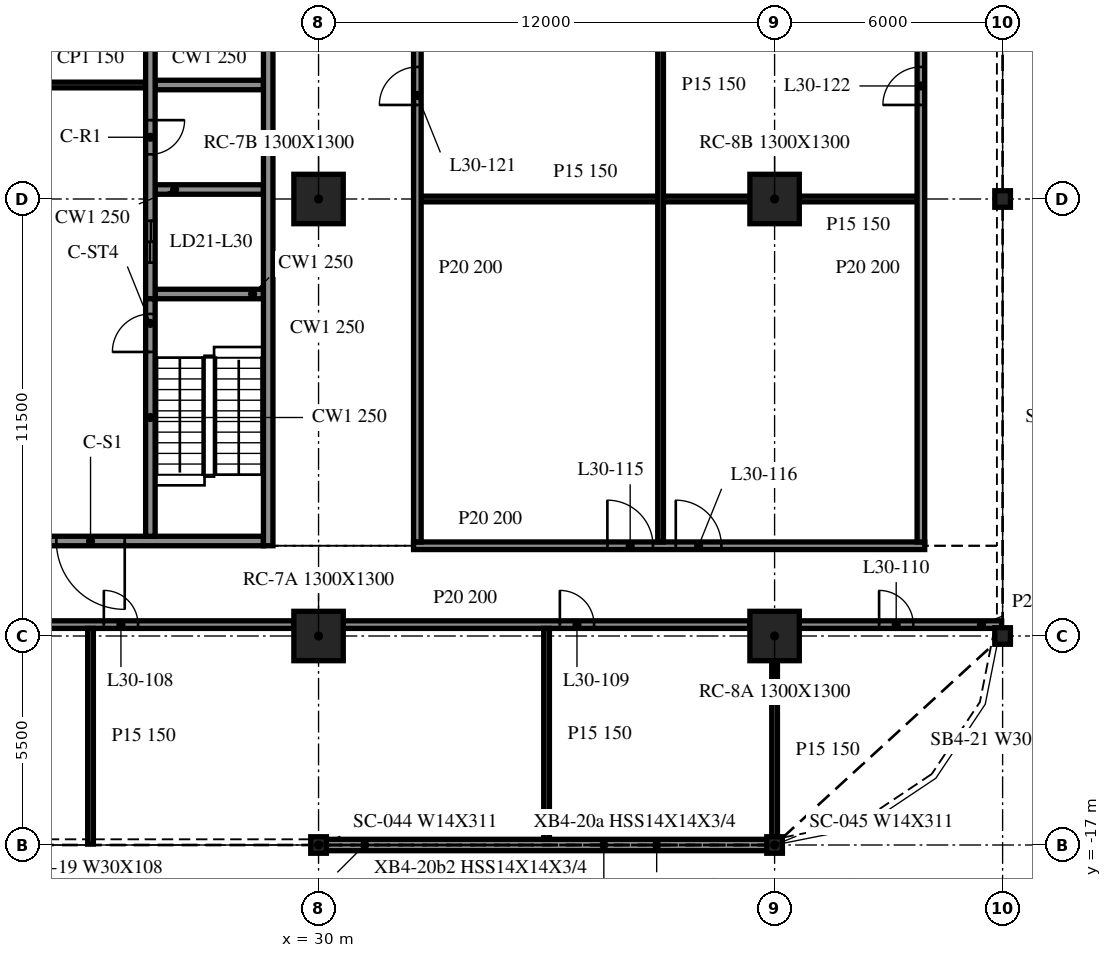
"""IFC4 building model, lengths in metres.
Left out: names, types, materials, properties, quantities, classifications, styles, units other than length and angle.
Written with IfcOpenShell. Run it as: python <this file> out.ifc"""

import sys

from ifc_helpers import new_model, si_unit, direction, frame, frame_2d, origin, origin_2d, place, context, subcontext, project, spatial, rectangle, i_section, extrude, element, fill, save


model = new_model("IFC4")
c1 = context("Model", 3, precision=1e-05, world=origin(), true_north=direction((0.0, 1.0)))
c2 = subcontext(c1, "Body", "Model", "MODEL_VIEW")
j1 = project(units=[si_unit("LENGTHUNIT", "METRE"), si_unit("PLANEANGLEUNIT", "RADIAN")], contexts=[c1])
p1 = place(None, origin())
s1 = spatial("IfcSite", under=j1, at=p1, CompositionType="ELEMENT")
p2 = place(p1, origin())
s2 = spatial("IfcBuilding", under=s1, at=p2, CompositionType="ELEMENT")
p3 = place(p2, frame((0.0, 0.0, 130.2)))
s3 = spatial("IfcBuildingStorey", under=s2, at=p3, CompositionType="ELEMENT", Elevation=130.2)
for number, where, z_axis, x_axis in (
    (1, (30.0, -11.5, -0.34), (0.0, 0.0, 1.0), (1.0, 0.0, 0.0)),
    (2, (30.0, 0.0, -0.34), (0.0, 0.0, 1.0), (1.0, 0.0, 0.0)),
    (3, (42.0, -11.5, -0.34), (0.0, 0.0, 1.0), (1.0, 0.0, 0.0)),
    (4, (42.0, 0.0, -0.34), (0.0, 0.0, 1.0), (1.0, 0.0, 0.0)),
):
    element("IfcColumn", number, at=place(p3, frame(where, z_axis=z_axis, x_axis=x_axis)), inside=s3, PredefinedType="COLUMN", context=c2, shape_type="SweptSolid", body=[
        extrude(rectangle(XDim=1.3, YDim=1.3, at=origin_2d()), origin(), (0.0, 0.0, 1.0), 4.1),
    ])
for number, where, z_axis, x_axis in (
    (5, (30.0, -17.0, -0.34), (0.0, 0.0, 1.0), (1.0, 0.0, 0.0)),
    (6, (42.0, -17.0, -0.34), (0.0, 0.0, 1.0), (1.0, 0.0, 0.0)),
    (7, (48.0, -11.5, -0.34), (0.0, 0.0, 1.0), (1.0, 0.0, 0.0)),
    (8, (48.0, 0.0, -0.34), (0.0, 0.0, 1.0), (1.0, 0.0, 0.0)),
):
    element("IfcColumn", number, at=place(p3, frame(where, z_axis=z_axis, x_axis=x_axis)), inside=s3, PredefinedType="COLUMN", context=c2, shape_type="SweptSolid", body=[
        extrude(i_section(OverallWidth=0.412, OverallDepth=0.434, WebThickness=0.036, FlangeThickness=0.057, at=origin_2d()), origin(), (0.0, 0.0, 1.0), 4.1),
    ])
p4 = place(p3, frame((30.018, -17.0, 0.0), z_axis=(0.0, 0.0, 1.0), x_axis=(1.0, 0.0, 0.0)))
e9 = element("IfcWall", 9, at=p4, inside=s3, PredefinedType="NOTDEFINED", context=c2, shape_type="SweptSolid", body=[
    extrude(rectangle(XDim=11.964, YDim=0.3, at=frame_2d((5.982, 0.0))), origin(), (0.0, 0.0, 1.0), 3.003),
])
p5 = place(p3, frame((28.675, -9.125, 0.0), z_axis=(0.0, 0.0, 1.0), x_axis=(0.0, 1.0, 0.0)))
e10 = element("IfcWall", 10, at=p5, inside=s3, PredefinedType="SOLIDWALL", context=c2, shape_type="SweptSolid", body=[
    extrude(rectangle(XDim=24.25, YDim=0.25, at=frame_2d((12.125, 0.0))), origin(), (0.0, 0.0, 1.0), 3.76),
])
p6 = place(p5, frame((14.425, 0.0, 0.0)))
e11 = element("IfcOpeningElement", 11, at=p6, cuts=e10, PredefinedType="OPENING", context=c2, shape_type="SweptSolid", body=[
    extrude(rectangle(XDim=0.9, YDim=2.1, at=frame_2d((0.45, 1.05))), frame((0.0, 0.135, 0.0), z_axis=(0.0, -1.0, 0.0), x_axis=(1.0, 0.0, 0.0)), (0.0, 0.0, 1.0), 0.27),
])
p7 = place(p5, frame((19.012, 0.0, 0.0)))
e12 = element("IfcOpeningElement", 12, at=p7, cuts=e10, PredefinedType="OPENING", context=c2, shape_type="SweptSolid", body=[
    extrude(rectangle(XDim=0.9, YDim=2.1, at=frame_2d((0.45, 1.05))), frame((0.0, 0.135, 0.0), z_axis=(0.0, -1.0, 0.0), x_axis=(1.0, 0.0, 0.0)), (0.0, 0.0, 1.0), 0.27),
])
p8 = place(p5, frame((22.087, 0.0, 0.0)))
e13 = element("IfcOpeningElement", 13, at=p8, cuts=e10, PredefinedType="OPENING", context=c2, shape_type="SweptSolid", body=[
    extrude(rectangle(XDim=0.9, YDim=2.1, at=frame_2d((0.45, 1.05))), frame((0.0, 0.135, 0.0), z_axis=(0.0, -1.0, 0.0), x_axis=(1.0, 0.0, 0.0)), (0.0, 0.0, 1.0), 0.27),
])
p9 = place(p3, frame((28.55, -9.0, 0.0), z_axis=(0.0, 0.0, 1.0), x_axis=(-1.0, 0.0, 0.0)))
e14 = element("IfcWall", 14, at=p9, inside=s3, PredefinedType="SOLIDWALL", context=c2, shape_type="SweptSolid", body=[
    extrude(rectangle(XDim=9.1, YDim=0.25, at=frame_2d((4.55, 0.0))), origin(), (0.0, 0.0, 1.0), 3.76),
])
p10 = place(p9, frame((3.65, 0.0, 0.0)))
e15 = element("IfcOpeningElement", 15, at=p10, cuts=e14, PredefinedType="OPENING", context=c2, shape_type="SweptSolid", body=[
    extrude(rectangle(XDim=1.8, YDim=2.1, at=frame_2d((0.9, 1.05))), frame((0.0, 0.135, 0.0), z_axis=(0.0, -1.0, 0.0), x_axis=(1.0, 0.0, 0.0)), (0.0, 0.0, 1.0), 0.27),
])
p11 = place(p3, frame((25.575, -8.875, 0.0), z_axis=(0.0, 0.0, 1.0), x_axis=(0.0, 1.0, 0.0)))
e16 = element("IfcWall", 16, at=p11, inside=s3, PredefinedType="SOLIDWALL", context=c2, shape_type="SweptSolid", body=[
    extrude(rectangle(XDim=6.25, YDim=0.25, at=frame_2d((3.125, 0.0))), origin(), (0.0, 0.0, 1.0), 3.76),
])
p12 = place(p11, frame((4.85, 0.0, 0.0)))
e17 = element("IfcOpeningElement", 17, at=p12, cuts=e16, PredefinedType="OPENING", context=c2, shape_type="SweptSolid", body=[
    extrude(rectangle(XDim=1.0, YDim=2.1, at=frame_2d((0.5, 1.05))), frame((0.0, 0.135, 0.0), z_axis=(0.0, -1.0, 0.0), x_axis=(1.0, 0.0, 0.0)), (0.0, 0.0, 1.0), 0.27),
])
p13 = place(p3, frame((25.575, 14.875, 0.0), z_axis=(0.0, 0.0, 1.0), x_axis=(0.0, -1.0, 0.0)))
e18 = element("IfcWall", 18, at=p13, inside=s3, PredefinedType="SOLIDWALL", context=c2, shape_type="SweptSolid", body=[
    extrude(rectangle(XDim=17.5, YDim=0.25, at=frame_2d((8.75, 0.0))), origin(), (0.0, 0.0, 1.0), 3.76),
])
p14 = place(p13, frame((15.45, 0.0, 0.0)))
e19 = element("IfcOpeningElement", 19, at=p14, cuts=e18, PredefinedType="OPENING", context=c2, shape_type="SweptSolid", body=[
    extrude(rectangle(XDim=1.1, YDim=2.1, at=frame_2d((0.55, 1.05))), frame((0.0, 0.135, 0.0), z_axis=(0.0, -1.0, 0.0), x_axis=(1.0, 0.0, 0.0)), (0.0, 0.0, 1.0), 0.27),
])
p15 = place(p13, frame((12.8, 0.0, 0.0)))
e20 = element("IfcOpeningElement", 20, at=p15, cuts=e18, PredefinedType="OPENING", context=c2, shape_type="SweptSolid", body=[
    extrude(rectangle(XDim=0.9, YDim=2.1, at=frame_2d((0.45, 1.05))), frame((0.0, 0.135, 0.0), z_axis=(0.0, -1.0, 0.0), x_axis=(1.0, 0.0, 0.0)), (0.0, 0.0, 1.0), 0.27),
])
for number, where, z_axis, x_axis in (
    (21, (25.7, -2.5, 0.0), (0.0, 0.0, 1.0), (1.0, 0.0, 0.0)),
    (22, (25.7, 0.25, 0.0), (0.0, 0.0, 1.0), (1.0, 0.0, 0.0)),
    (23, (25.7, 3.0, 0.0), (0.0, 0.0, 1.0), (1.0, 0.0, 0.0)),
):
    element("IfcWall", number, at=place(p3, frame(where, z_axis=z_axis, x_axis=x_axis)), inside=s3, PredefinedType="SOLIDWALL", context=c2, shape_type="SweptSolid", body=[
        extrude(rectangle(XDim=2.85, YDim=0.25, at=frame_2d((1.425, 0.0))), origin(), (0.0, 0.0, 1.0), 3.76),
    ])
p16 = place(p3, frame((22.55, 3.0, 0.0), z_axis=(0.0, 0.0, 1.0), x_axis=(1.0, 0.0, 0.0)))
e24 = element("IfcWall", 24, at=p16, inside=s3, PredefinedType="PARTITIONING", context=c2, shape_type="SweptSolid", body=[
    extrude(rectangle(XDim=2.9, YDim=0.15, at=frame_2d((1.45, 0.0))), origin(), (0.0, 0.0, 1.0), 3.76),
])
p17 = place(p3, frame((18.65, -11.2, 0.0), z_axis=(0.0, 0.0, 1.0), x_axis=(1.0, 0.0, 0.0)))
e25 = element("IfcWall", 25, at=p17, inside=s3, PredefinedType="PARTITIONING", context=c2, shape_type="SweptSolid", body=[
    extrude(rectangle(XDim=10.7, YDim=0.2, at=frame_2d((5.35, 0.0))), origin(), (0.0, 0.0, 1.0), 3.76),
])
p18 = place(p17, frame((5.7, 0.0, 0.0)))
e26 = element("IfcOpeningElement", 26, at=p18, cuts=e25, PredefinedType="OPENING", context=c2, shape_type="SweptSolid", body=[
    extrude(rectangle(XDim=0.9, YDim=2.1, at=frame_2d((0.45, 1.05))), frame((0.0, 0.11, 0.0), z_axis=(0.0, -1.0, 0.0), x_axis=(1.0, 0.0, 0.0)), (0.0, 0.0, 1.0), 0.22),
])
p19 = place(p3, frame((30.65, -11.2, 0.0), z_axis=(0.0, 0.0, 1.0), x_axis=(1.0, 0.0, 0.0)))
e27 = element("IfcWall", 27, at=p19, inside=s3, PredefinedType="PARTITIONING", context=c2, shape_type="SweptSolid", body=[
    extrude(rectangle(XDim=10.7, YDim=0.2, at=frame_2d((5.35, 0.0))), origin(), (0.0, 0.0, 1.0), 3.76),
])
p20 = place(p19, frame((5.7, 0.0, 0.0)))
e28 = element("IfcOpeningElement", 28, at=p20, cuts=e27, PredefinedType="OPENING", context=c2, shape_type="SweptSolid", body=[
    extrude(rectangle(XDim=0.9, YDim=2.1, at=frame_2d((0.45, 1.05))), frame((0.0, 0.11, 0.0), z_axis=(0.0, -1.0, 0.0), x_axis=(1.0, 0.0, 0.0)), (0.0, 0.0, 1.0), 0.22),
])
p21 = place(p3, frame((42.65, -11.2, 0.0), z_axis=(0.0, 0.0, 1.0), x_axis=(1.0, 0.0, 0.0)))
e29 = element("IfcWall", 29, at=p21, inside=s3, PredefinedType="PARTITIONING", context=c2, shape_type="SweptSolid", body=[
    extrude(rectangle(XDim=5.325, YDim=0.2, at=frame_2d((2.663, 0.0))), origin(), (0.0, 0.0, 1.0), 3.76),
])
p22 = place(p21, frame((2.1, 0.0, 0.0)))
e30 = element("IfcOpeningElement", 30, at=p22, cuts=e29, PredefinedType="OPENING", context=c2, shape_type="SweptSolid", body=[
    extrude(rectangle(XDim=0.9, YDim=2.1, at=frame_2d((0.45, 1.05))), frame((0.0, 0.11, 0.0), z_axis=(0.0, -1.0, 0.0), x_axis=(1.0, 0.0, 0.0)), (0.0, 0.0, 1.0), 0.22),
])
p23 = place(p3, frame((32.5, -9.125, 0.0), z_axis=(0.0, 0.0, 1.0), x_axis=(1.0, 0.0, 0.0)))
e31 = element("IfcWall", 31, at=p23, inside=s3, PredefinedType="PARTITIONING", context=c2, shape_type="SweptSolid", body=[
    extrude(rectangle(XDim=13.45, YDim=0.2, at=frame_2d((6.725, 0.0))), origin(), (0.0, 0.0, 1.0), 3.76),
])
p24 = place(p23, frame((5.1, 0.0, 0.0)))
e32 = element("IfcOpeningElement", 32, at=p24, cuts=e31, PredefinedType="OPENING", context=c2, shape_type="SweptSolid", body=[
    extrude(rectangle(XDim=1.2, YDim=2.1, at=frame_2d((0.6, 1.05))), frame((0.0, 0.11, 0.0), z_axis=(0.0, -1.0, 0.0), x_axis=(1.0, 0.0, 0.0)), (0.0, 0.0, 1.0), 0.22),
])
p25 = place(p23, frame((6.9, 0.0, 0.0)))
e33 = element("IfcOpeningElement", 33, at=p25, cuts=e31, PredefinedType="OPENING", context=c2, shape_type="SweptSolid", body=[
    extrude(rectangle(XDim=1.2, YDim=2.1, at=frame_2d((0.6, 1.05))), frame((0.0, 0.11, 0.0), z_axis=(0.0, -1.0, 0.0), x_axis=(1.0, 0.0, 0.0)), (0.0, 0.0, 1.0), 0.22),
])
p26 = place(p3, frame((32.7, 0.0, 0.0), z_axis=(0.0, 0.0, 1.0), x_axis=(1.0, 0.0, 0.0)))
e34 = element("IfcWall", 34, at=p26, inside=s3, PredefinedType="PARTITIONING", context=c2, shape_type="SweptSolid", body=[
    extrude(rectangle(XDim=8.65, YDim=0.15, at=frame_2d((4.325, 0.0))), origin(), (0.0, 0.0, 1.0), 3.76),
])
p27 = place(p3, frame((42.65, 0.0, 0.0), z_axis=(0.0, 0.0, 1.0), x_axis=(1.0, 0.0, 0.0)))
e35 = element("IfcWall", 35, at=p27, inside=s3, PredefinedType="PARTITIONING", context=c2, shape_type="SweptSolid", body=[
    extrude(rectangle(XDim=3.1, YDim=0.15, at=frame_2d((1.55, 0.0))), origin(), (0.0, 0.0, 1.0), 3.76),
])
p28 = place(p3, frame((24.0, -16.975, 0.0), z_axis=(0.0, 0.0, 1.0), x_axis=(0.0, 1.0, 0.0)))
e36 = element("IfcWall", 36, at=p28, inside=s3, PredefinedType="PARTITIONING", context=c2, shape_type="SweptSolid", body=[
    extrude(rectangle(XDim=5.675, YDim=0.15, at=frame_2d((2.837, 0.0))), origin(), (0.0, 0.0, 1.0), 3.76),
])
p29 = place(p3, frame((32.6, -9.025, 0.0), z_axis=(0.0, 0.0, 1.0), x_axis=(0.0, 1.0, 0.0)))
e37 = element("IfcWall", 37, at=p29, inside=s3, PredefinedType="PARTITIONING", context=c2, shape_type="SweptSolid", body=[
    extrude(rectangle(XDim=24.05, YDim=0.2, at=frame_2d((12.025, 0.0))), origin(), (0.0, 0.0, 1.0), 3.76),
])
p30 = place(p29, frame((11.5, 0.0, 0.0)))
e38 = element("IfcOpeningElement", 38, at=p30, cuts=e37, PredefinedType="OPENING", context=c2, shape_type="SweptSolid", body=[
    extrude(rectangle(XDim=1.0, YDim=2.1, at=frame_2d((0.5, 1.05))), frame((0.0, 0.11, 0.0), z_axis=(0.0, -1.0, 0.0), x_axis=(1.0, 0.0, 0.0)), (0.0, 0.0, 1.0), 0.22),
])
p31 = place(p3, frame((36.0, -16.85, 0.0), z_axis=(0.0, 0.0, 1.0), x_axis=(0.0, 1.0, 0.0)))
e39 = element("IfcWall", 39, at=p31, inside=s3, PredefinedType="PARTITIONING", context=c2, shape_type="SweptSolid", body=[
    extrude(rectangle(XDim=5.55, YDim=0.15, at=frame_2d((2.775, 0.0))), origin(), (0.0, 0.0, 1.0), 3.76),
])
p32 = place(p3, frame((39.0, -9.025, 0.0), z_axis=(0.0, 0.0, 1.0), x_axis=(0.0, 1.0, 0.0)))
e40 = element("IfcWall", 40, at=p32, inside=s3, PredefinedType="PARTITIONING", context=c2, shape_type="SweptSolid", body=[
    extrude(rectangle(XDim=24.05, YDim=0.15, at=frame_2d((12.025, 0.0))), origin(), (0.0, 0.0, 1.0), 3.76),
])
p33 = place(p3, frame((42.0, -16.847, 0.0), z_axis=(0.0, 0.0, 1.0), x_axis=(0.0, 1.0, 0.0)))
e41 = element("IfcWall", 41, at=p33, inside=s3, PredefinedType="PARTITIONING", context=c2, shape_type="SweptSolid", body=[
    extrude(rectangle(XDim=4.697, YDim=0.15, at=frame_2d((2.349, 0.0))), origin(), (0.0, 0.0, 1.0), 3.76),
])
p34 = place(p3, frame((45.85, -9.025, 0.0), z_axis=(0.0, 0.0, 1.0), x_axis=(0.0, 1.0, 0.0)))
e42 = element("IfcWall", 42, at=p34, inside=s3, PredefinedType="PARTITIONING", context=c2, shape_type="SweptSolid", body=[
    extrude(rectangle(XDim=24.05, YDim=0.2, at=frame_2d((12.025, 0.0))), origin(), (0.0, 0.0, 1.0), 3.76),
])
p35 = place(p34, frame((11.5, 0.0, 0.0)))
e43 = element("IfcOpeningElement", 43, at=p35, cuts=e42, PredefinedType="OPENING", context=c2, shape_type="SweptSolid", body=[
    extrude(rectangle(XDim=1.0, YDim=2.1, at=frame_2d((0.5, 1.05))), frame((0.0, 0.11, 0.0), z_axis=(0.0, -1.0, 0.0), x_axis=(1.0, 0.0, 0.0)), (0.0, 0.0, 1.0), 0.22),
])
p36 = place(p10, origin())
e44 = element("IfcDoor", 44, at=p36, inside=s3, OperationType="DOUBLE_DOOR_SINGLE_SWING", PredefinedType="DOOR", context=c2, shape_type="SweptSolid", body=[
    extrude(rectangle(XDim=1.8, YDim=2.1, at=frame_2d((0.9, 1.05))), frame((0.0, 0.025, 0.0), z_axis=(0.0, -1.0, 0.0), x_axis=(1.0, 0.0, 0.0)), (0.0, 0.0, 1.0), 0.05),
])
fill(e15, e44)
p37 = place(p14, origin())
e45 = element("IfcDoor", 45, at=p37, inside=s3, OperationType="DOUBLE_DOOR_SLIDING", PredefinedType="DOOR", context=c2, shape_type="SweptSolid", body=[
    extrude(rectangle(XDim=1.1, YDim=2.1, at=frame_2d((0.55, 1.05))), frame((0.0, 0.025, 0.0), z_axis=(0.0, -1.0, 0.0), x_axis=(1.0, 0.0, 0.0)), (0.0, 0.0, 1.0), 0.05),
])
fill(e19, e45)
p38 = place(p15, origin())
e46 = element("IfcDoor", 46, at=p38, inside=s3, OperationType="SINGLE_SWING_LEFT", PredefinedType="DOOR", context=c2, shape_type="SweptSolid", body=[
    extrude(rectangle(XDim=0.9, YDim=2.1, at=frame_2d((0.45, 1.05))), frame((0.0, 0.025, 0.0), z_axis=(0.0, -1.0, 0.0), x_axis=(1.0, 0.0, 0.0)), (0.0, 0.0, 1.0), 0.05),
])
fill(e20, e46)
p39 = place(p12, origin())
e47 = element("IfcDoor", 47, at=p39, inside=s3, OperationType="SINGLE_SWING_RIGHT", PredefinedType="DOOR", context=c2, shape_type="SweptSolid", body=[
    extrude(rectangle(XDim=1.0, YDim=2.1, at=frame_2d((0.5, 1.05))), frame((0.0, 0.025, 0.0), z_axis=(0.0, -1.0, 0.0), x_axis=(1.0, 0.0, 0.0)), (0.0, 0.0, 1.0), 0.05),
])
fill(e17, e47)
p40 = place(p18, origin())
e48 = element("IfcDoor", 48, at=p40, inside=s3, OperationType="SINGLE_SWING_LEFT", PredefinedType="DOOR", context=c2, shape_type="SweptSolid", body=[
    extrude(rectangle(XDim=0.9, YDim=2.1, at=frame_2d((0.45, 1.05))), frame((0.0, 0.025, 0.0), z_axis=(0.0, -1.0, 0.0), x_axis=(1.0, 0.0, 0.0)), (0.0, 0.0, 1.0), 0.05),
])
fill(e26, e48)
p41 = place(p20, origin())
e49 = element("IfcDoor", 49, at=p41, inside=s3, OperationType="SINGLE_SWING_LEFT", PredefinedType="DOOR", context=c2, shape_type="SweptSolid", body=[
    extrude(rectangle(XDim=0.9, YDim=2.1, at=frame_2d((0.45, 1.05))), frame((0.0, 0.025, 0.0), z_axis=(0.0, -1.0, 0.0), x_axis=(1.0, 0.0, 0.0)), (0.0, 0.0, 1.0), 0.05),
])
fill(e28, e49)
p42 = place(p22, origin())
e50 = element("IfcDoor", 50, at=p42, inside=s3, OperationType="SINGLE_SWING_RIGHT", PredefinedType="DOOR", context=c2, shape_type="SweptSolid", body=[
    extrude(rectangle(XDim=0.9, YDim=2.1, at=frame_2d((0.45, 1.05))), frame((0.0, 0.025, 0.0), z_axis=(0.0, -1.0, 0.0), x_axis=(1.0, 0.0, 0.0)), (0.0, 0.0, 1.0), 0.05),
])
fill(e30, e50)
p43 = place(p24, origin())
e51 = element("IfcDoor", 51, at=p43, inside=s3, OperationType="SINGLE_SWING_LEFT", PredefinedType="DOOR", context=c2, shape_type="SweptSolid", body=[
    extrude(rectangle(XDim=1.2, YDim=2.1, at=frame_2d((0.6, 1.05))), frame((0.0, 0.025, 0.0), z_axis=(0.0, -1.0, 0.0), x_axis=(1.0, 0.0, 0.0)), (0.0, 0.0, 1.0), 0.05),
])
fill(e32, e51)
p44 = place(p25, origin())
e52 = element("IfcDoor", 52, at=p44, inside=s3, OperationType="SINGLE_SWING_RIGHT", PredefinedType="DOOR", context=c2, shape_type="SweptSolid", body=[
    extrude(rectangle(XDim=1.2, YDim=2.1, at=frame_2d((0.6, 1.05))), frame((0.0, 0.025, 0.0), z_axis=(0.0, -1.0, 0.0), x_axis=(1.0, 0.0, 0.0)), (0.0, 0.0, 1.0), 0.05),
])
fill(e33, e52)
p45 = place(p30, origin())
e53 = element("IfcDoor", 53, at=p45, inside=s3, OperationType="SINGLE_SWING_RIGHT", PredefinedType="DOOR", context=c2, shape_type="SweptSolid", body=[
    extrude(rectangle(XDim=1.0, YDim=2.1, at=frame_2d((0.5, 1.05))), frame((0.0, 0.025, 0.0), z_axis=(0.0, -1.0, 0.0), x_axis=(1.0, 0.0, 0.0)), (0.0, 0.0, 1.0), 0.05),
])
fill(e38, e53)
p46 = place(p35, origin())
e54 = element("IfcDoor", 54, at=p46, inside=s3, OperationType="SINGLE_SWING_LEFT", PredefinedType="DOOR", context=c2, shape_type="SweptSolid", body=[
    extrude(rectangle(XDim=1.0, YDim=2.1, at=frame_2d((0.5, 1.05))), frame((0.0, 0.025, 0.0), z_axis=(0.0, -1.0, 0.0), x_axis=(1.0, 0.0, 0.0)), (0.0, 0.0, 1.0), 0.05),
])
fill(e43, e54)
save(model, sys.argv[1])
